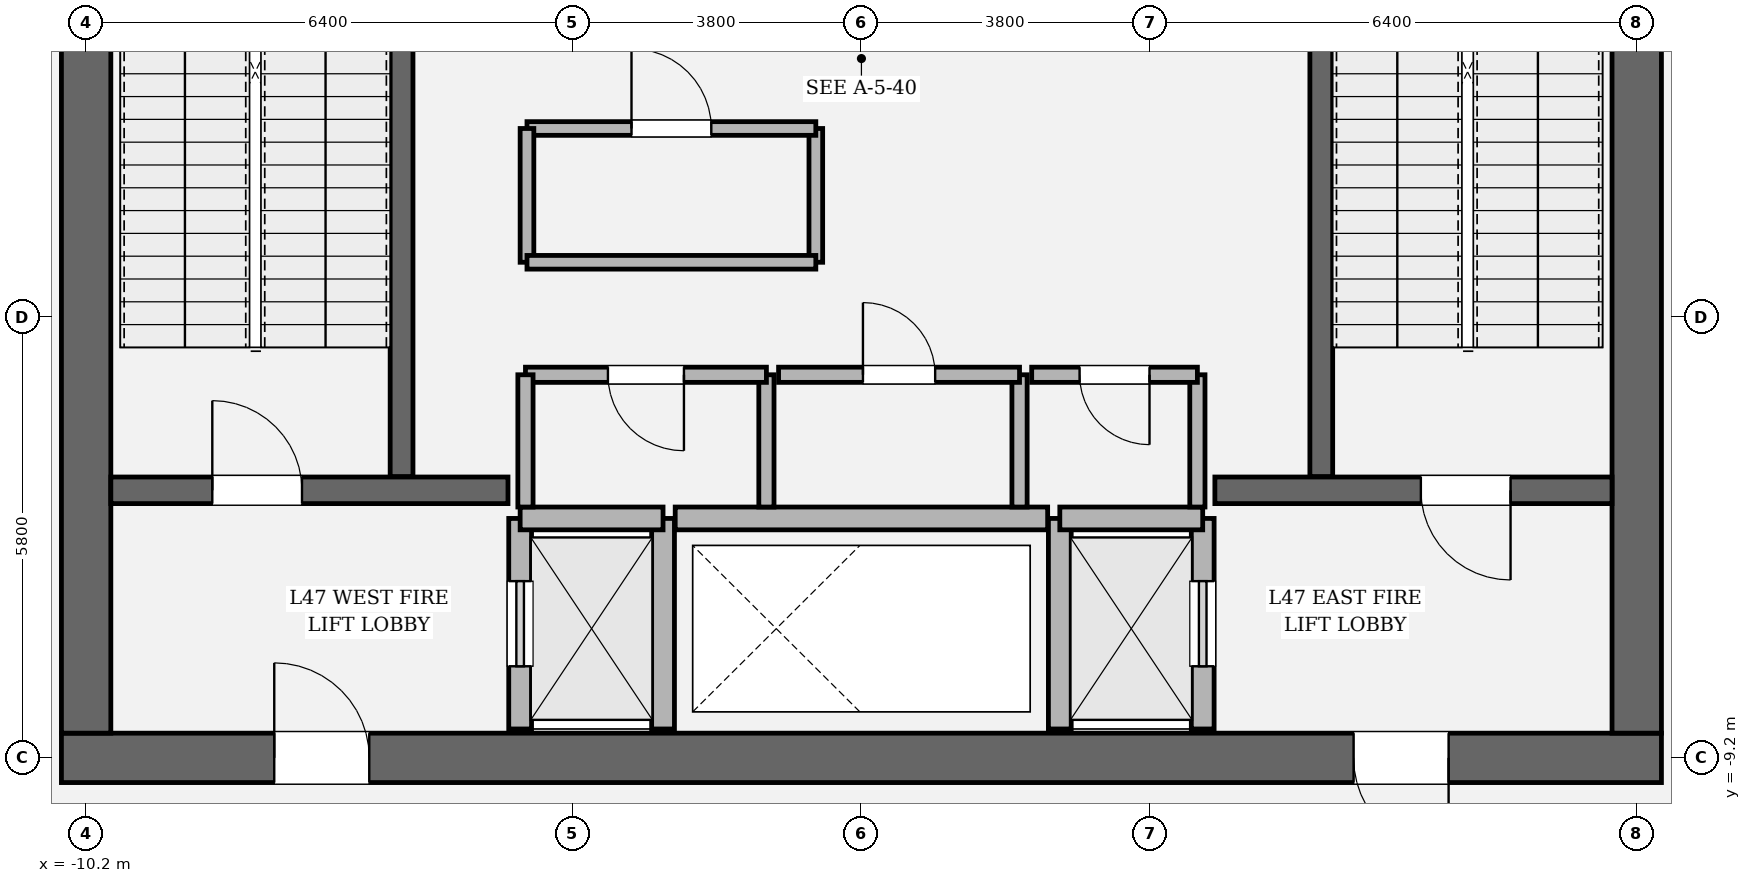
"""IFC4 building model, lengths in metres.
Left out: names, types, materials, properties, quantities, classifications, styles, units other than length and angle.
Written with IfcOpenShell. Run it as: python <this file> out.ifc"""

import sys

from ifc_helpers import new_model, si_unit, direction, frame, frame_2d, origin, place, context, subcontext, project, spatial, rectangle, extrude, element, fill, save


model = new_model("IFC4")
c1 = context("Model", 3, precision=1e-05, world=origin(), true_north=direction((0.0, 1.0)))
c2 = subcontext(c1, "Body", "Model", "MODEL_VIEW")
j1 = project(units=[si_unit("LENGTHUNIT", "METRE"), si_unit("PLANEANGLEUNIT", "RADIAN")], contexts=[c1])
p1 = place(None, origin())
s1 = spatial("IfcSite", under=j1, at=p1, CompositionType="ELEMENT")
p2 = place(p1, origin())
s2 = spatial("IfcBuilding", under=s1, at=p2, CompositionType="ELEMENT")
p3 = place(p2, frame((0.0, 0.0, 200.55)))
s3 = spatial("IfcBuildingStorey", under=s2, at=p3, CompositionType="ELEMENT", Elevation=200.55)
p4 = place(p3, frame((10.525, -9.2, 0.0), z_axis=(0.0, 0.0, 1.0), x_axis=(-1.0, 0.0, 0.0)))
e1 = element("IfcWall", 1, at=p4, inside=s3, PredefinedType="SHEAR", context=c2, shape_type="SweptSolid", body=[
    extrude(rectangle(XDim=21.05, YDim=0.65, at=frame_2d((10.525, 0.0))), origin(), (0.0, 0.0, 1.0), 4.05),
])
p5 = place(p4, frame((2.8, 0.0, 0.0)))
e2 = element("IfcOpeningElement", 2, at=p5, cuts=e1, PredefinedType="OPENING", context=c2, shape_type="SweptSolid", body=[
    extrude(rectangle(XDim=1.25, YDim=2.25, at=frame_2d((0.625, 1.125))), frame((0.0, 0.335, 0.0), z_axis=(0.0, -1.0, 0.0), x_axis=(1.0, 0.0, 0.0)), (0.0, 0.0, 1.0), 0.67),
])
p6 = place(p4, frame((17.0, 0.0, 0.0)))
e3 = element("IfcOpeningElement", 3, at=p6, cuts=e1, PredefinedType="OPENING", context=c2, shape_type="SweptSolid", body=[
    extrude(rectangle(XDim=1.25, YDim=2.25, at=frame_2d((0.625, 1.125))), frame((0.0, 0.335, 0.0), z_axis=(0.0, -1.0, 0.0), x_axis=(1.0, 0.0, 0.0)), (0.0, 0.0, 1.0), 0.67),
])
p7 = place(p3, frame((-10.2, -8.875, 0.0), z_axis=(0.0, 0.0, 1.0), x_axis=(0.0, 1.0, 0.0)))
e4 = element("IfcWall", 4, at=p7, inside=s3, PredefinedType="SHEAR", context=c2, shape_type="SweptSolid", body=[
    extrude(rectangle(XDim=17.75, YDim=0.65, at=frame_2d((8.875, 0.0))), origin(), (0.0, 0.0, 1.0), 4.05),
])
p8 = place(p7, frame((12.665, 0.0, 0.0)))
e5 = element("IfcOpeningElement", 5, at=p8, cuts=e4, PredefinedType="OPENING", context=c2, shape_type="SweptSolid", body=[
    extrude(rectangle(XDim=1.18, YDim=2.2, at=frame_2d((0.59, 1.1))), frame((0.0, 0.335, 0.0), z_axis=(0.0, -1.0, 0.0), x_axis=(1.0, 0.0, 0.0)), (0.0, 0.0, 1.0), 0.67),
])
p9 = place(p3, frame((10.2, 8.875, 0.0), z_axis=(0.0, 0.0, 1.0), x_axis=(0.0, -1.0, 0.0)))
e6 = element("IfcWall", 6, at=p9, inside=s3, PredefinedType="SHEAR", context=c2, shape_type="SweptSolid", body=[
    extrude(rectangle(XDim=17.75, YDim=0.65, at=frame_2d((8.875, 0.0))), origin(), (0.0, 0.0, 1.0), 4.05),
])
p10 = place(p9, frame((3.905, 0.0, 0.0)))
e7 = element("IfcOpeningElement", 7, at=p10, cuts=e6, PredefinedType="OPENING", context=c2, shape_type="SweptSolid", body=[
    extrude(rectangle(XDim=1.18, YDim=2.2, at=frame_2d((0.59, 1.1))), frame((0.0, 0.335, 0.0), z_axis=(0.0, -1.0, 0.0), x_axis=(1.0, 0.0, 0.0)), (0.0, 0.0, 1.0), 0.67),
])
for number, where, z_axis, x_axis in (
    (8, (-6.05, -5.5, 0.0), (0.0, 0.0, 1.0), (0.0, 1.0, 0.0)),
    (9, (6.05, 3.45, 0.0), (0.0, 0.0, 1.0), (0.0, -1.0, 0.0)),
):
    element("IfcWall", number, at=place(p3, frame(where, z_axis=z_axis, x_axis=x_axis)), inside=s3, PredefinedType="SOLIDWALL", context=c2, shape_type="SweptSolid", body=[
        extrude(rectangle(XDim=8.95, YDim=0.3, at=frame_2d((4.475, 0.0))), origin(), (0.0, 0.0, 1.0), 4.05),
    ])
p11 = place(p3, frame((-9.875, -5.68, 0.0), z_axis=(0.0, 0.0, 1.0), x_axis=(1.0, 0.0, 0.0)))
e10 = element("IfcWall", 10, at=p11, inside=s3, PredefinedType="SOLIDWALL", context=c2, shape_type="SweptSolid", body=[
    extrude(rectangle(XDim=5.225, YDim=0.35, at=frame_2d((2.613, 0.0))), origin(), (0.0, 0.0, 1.0), 4.05),
])
p12 = place(p11, frame((1.335, 0.0, 0.0)))
e11 = element("IfcOpeningElement", 11, at=p12, cuts=e10, PredefinedType="OPENING", context=c2, shape_type="SweptSolid", body=[
    extrude(rectangle(XDim=1.18, YDim=2.2, at=frame_2d((0.59, 1.1))), frame((0.0, 0.185, 0.0), z_axis=(0.0, -1.0, 0.0), x_axis=(1.0, 0.0, 0.0)), (0.0, 0.0, 1.0), 0.37),
])
p13 = place(p3, frame((4.65, -5.68, 0.0), z_axis=(0.0, 0.0, 1.0), x_axis=(1.0, 0.0, 0.0)))
e12 = element("IfcWall", 12, at=p13, inside=s3, PredefinedType="SOLIDWALL", context=c2, shape_type="SweptSolid", body=[
    extrude(rectangle(XDim=5.225, YDim=0.35, at=frame_2d((2.613, 0.0))), origin(), (0.0, 0.0, 1.0), 4.05),
])
p14 = place(p13, frame((2.71, 0.0, 0.0)))
e13 = element("IfcOpeningElement", 13, at=p14, cuts=e12, PredefinedType="OPENING", context=c2, shape_type="SweptSolid", body=[
    extrude(rectangle(XDim=1.18, YDim=2.2, at=frame_2d((0.59, 1.1))), frame((0.0, 0.185, 0.0), z_axis=(0.0, -1.0, 0.0), x_axis=(1.0, 0.0, 0.0)), (0.0, 0.0, 1.0), 0.37),
])
p15 = place(p3, frame((-4.49, -8.82, 0.0), z_axis=(0.0, 0.0, 1.0), x_axis=(0.0, 1.0, 0.0)))
e14 = element("IfcWall", 14, at=p15, inside=s3, PredefinedType="SOLIDWALL", context=c2, shape_type="SweptSolid", body=[
    extrude(rectangle(XDim=2.77, YDim=0.3, at=frame_2d((1.385, 0.0))), origin(), (0.0, 0.0, 1.0), 3.77),
])
p16 = place(p15, frame((0.825, 0.0, 0.0)))
e15 = element("IfcOpeningElement", 15, at=p16, cuts=e14, PredefinedType="OPENING", context=c2, shape_type="SweptSolid", body=[
    extrude(rectangle(XDim=1.12, YDim=2.25, at=frame_2d((0.56, 1.125))), frame((0.0, 0.16, 0.0), z_axis=(0.0, -1.0, 0.0), x_axis=(1.0, 0.0, 0.0)), (0.0, 0.0, 1.0), 0.32),
])
p17 = place(p3, frame((-2.61, -8.82, 0.0), z_axis=(0.0, 0.0, 1.0), x_axis=(0.0, 1.0, 0.0)))
e16 = element("IfcWall", 16, at=p17, inside=s3, PredefinedType="SOLIDWALL", context=c2, shape_type="SweptSolid", body=[
    extrude(rectangle(XDim=2.77, YDim=0.3, at=frame_2d((1.385, 0.0))), origin(), (0.0, 0.0, 1.0), 3.77),
])
p18 = place(p3, frame((-4.49, -6.05, 0.0), z_axis=(0.0, 0.0, 1.0), x_axis=(1.0, 0.0, 0.0)))
e17 = element("IfcWall", 17, at=p18, inside=s3, PredefinedType="SOLIDWALL", context=c2, shape_type="SweptSolid", body=[
    extrude(rectangle(XDim=1.88, YDim=0.3, at=frame_2d((0.94, 0.0))), origin(), (0.0, 0.0, 1.0), 3.77),
])
p19 = place(p3, frame((4.49, -8.82, 0.0), z_axis=(0.0, 0.0, 1.0), x_axis=(0.0, 1.0, 0.0)))
e18 = element("IfcWall", 18, at=p19, inside=s3, PredefinedType="SOLIDWALL", context=c2, shape_type="SweptSolid", body=[
    extrude(rectangle(XDim=2.77, YDim=0.3, at=frame_2d((1.385, 0.0))), origin(), (0.0, 0.0, 1.0), 3.77),
])
p20 = place(p19, frame((0.825, 0.0, 0.0)))
e19 = element("IfcOpeningElement", 19, at=p20, cuts=e18, PredefinedType="OPENING", context=c2, shape_type="SweptSolid", body=[
    extrude(rectangle(XDim=1.12, YDim=2.25, at=frame_2d((0.56, 1.125))), frame((0.0, 0.16, 0.0), z_axis=(0.0, -1.0, 0.0), x_axis=(1.0, 0.0, 0.0)), (0.0, 0.0, 1.0), 0.32),
])
p21 = place(p3, frame((2.61, -8.82, 0.0), z_axis=(0.0, 0.0, 1.0), x_axis=(0.0, 1.0, 0.0)))
e20 = element("IfcWall", 20, at=p21, inside=s3, PredefinedType="SOLIDWALL", context=c2, shape_type="SweptSolid", body=[
    extrude(rectangle(XDim=2.77, YDim=0.3, at=frame_2d((1.385, 0.0))), origin(), (0.0, 0.0, 1.0), 3.77),
])
p22 = place(p3, frame((2.61, -6.05, 0.0), z_axis=(0.0, 0.0, 1.0), x_axis=(1.0, 0.0, 0.0)))
e21 = element("IfcWall", 21, at=p22, inside=s3, PredefinedType="SOLIDWALL", context=c2, shape_type="SweptSolid", body=[
    extrude(rectangle(XDim=1.88, YDim=0.3, at=frame_2d((0.94, 0.0))), origin(), (0.0, 0.0, 1.0), 3.77),
])
p23 = place(p3, frame((-2.45, -6.05, 0.0), z_axis=(0.0, 0.0, 1.0), x_axis=(1.0, 0.0, 0.0)))
e22 = element("IfcWall", 22, at=p23, inside=s3, PredefinedType="SOLIDWALL", context=c2, shape_type="SweptSolid", body=[
    extrude(rectangle(XDim=4.9, YDim=0.3, at=frame_2d((2.45, 0.0))), origin(), (0.0, 0.0, 1.0), 3.77),
])
p24 = place(p3, frame((-1.25, -5.9, 0.0), z_axis=(0.0, 0.0, 1.0), x_axis=(0.0, 1.0, 0.0)))
e23 = element("IfcWall", 23, at=p24, inside=s3, PredefinedType="SOLIDWALL", context=c2, shape_type="SweptSolid", body=[
    extrude(rectangle(XDim=1.74, YDim=0.2, at=frame_2d((0.87, 0.0))), origin(), (0.0, 0.0, 1.0), 3.77),
])
p25 = place(p3, frame((-1.25, -4.16, 0.0), z_axis=(0.0, 0.0, 1.0), x_axis=(-1.0, 0.0, 0.0)))
e24 = element("IfcWall", 24, at=p25, inside=s3, PredefinedType="SOLIDWALL", context=c2, shape_type="SweptSolid", body=[
    extrude(rectangle(XDim=3.17, YDim=0.2, at=frame_2d((1.585, 0.0))), origin(), (0.0, 0.0, 1.0), 3.77),
])
p26 = place(p25, frame((1.085, 0.0, 0.0)))
e25 = element("IfcOpeningElement", 25, at=p26, cuts=e24, PredefinedType="OPENING", context=c2, shape_type="SweptSolid", body=[
    extrude(rectangle(XDim=1.0, YDim=2.15, at=frame_2d((0.5, 1.075))), frame((0.0, 0.11, 0.0), z_axis=(0.0, -1.0, 0.0), x_axis=(1.0, 0.0, 0.0)), (0.0, 0.0, 1.0), 0.22),
])
for number, where, z_axis, x_axis in (
    (26, (-4.42, -4.16, 0.0), (0.0, 0.0, 1.0), (0.0, -1.0, 0.0)),
    (27, (2.08, -5.9, 0.0), (0.0, 0.0, 1.0), (0.0, 1.0, 0.0)),
):
    element("IfcWall", number, at=place(p3, frame(where, z_axis=z_axis, x_axis=x_axis)), inside=s3, PredefinedType="SOLIDWALL", context=c2, shape_type="SweptSolid", body=[
        extrude(rectangle(XDim=1.74, YDim=0.2, at=frame_2d((0.87, 0.0))), origin(), (0.0, 0.0, 1.0), 3.77),
    ])
p27 = place(p3, frame((2.08, -4.16, 0.0), z_axis=(0.0, 0.0, 1.0), x_axis=(-1.0, 0.0, 0.0)))
e28 = element("IfcWall", 28, at=p27, inside=s3, PredefinedType="SOLIDWALL", context=c2, shape_type="SweptSolid", body=[
    extrude(rectangle(XDim=3.17, YDim=0.2, at=frame_2d((1.585, 0.0))), origin(), (0.0, 0.0, 1.0), 3.77),
])
p28 = place(p27, frame((1.11, 0.0, 0.0)))
e29 = element("IfcOpeningElement", 29, at=p28, cuts=e28, PredefinedType="OPENING", context=c2, shape_type="SweptSolid", body=[
    extrude(rectangle(XDim=0.95, YDim=2.15, at=frame_2d((0.475, 1.075))), frame((0.0, 0.11, 0.0), z_axis=(0.0, -1.0, 0.0), x_axis=(1.0, 0.0, 0.0)), (0.0, 0.0, 1.0), 0.22),
])
p29 = place(p3, frame((4.42, -5.9, 0.0), z_axis=(0.0, 0.0, 1.0), x_axis=(0.0, 1.0, 0.0)))
e30 = element("IfcWall", 30, at=p29, inside=s3, PredefinedType="SOLIDWALL", context=c2, shape_type="SweptSolid", body=[
    extrude(rectangle(XDim=1.74, YDim=0.2, at=frame_2d((0.87, 0.0))), origin(), (0.0, 0.0, 1.0), 3.77),
])
p30 = place(p3, frame((4.42, -4.16, 0.0), z_axis=(0.0, 0.0, 1.0), x_axis=(-1.0, 0.0, 0.0)))
e31 = element("IfcWall", 31, at=p30, inside=s3, PredefinedType="SOLIDWALL", context=c2, shape_type="SweptSolid", body=[
    extrude(rectangle(XDim=2.18, YDim=0.2, at=frame_2d((1.09, 0.0))), origin(), (0.0, 0.0, 1.0), 3.77),
])
p31 = place(p30, frame((0.63, 0.0, 0.0)))
e32 = element("IfcOpeningElement", 32, at=p31, cuts=e31, PredefinedType="OPENING", context=c2, shape_type="SweptSolid", body=[
    extrude(rectangle(XDim=0.92, YDim=2.1, at=frame_2d((0.46, 1.05))), frame((0.0, 0.11, 0.0), z_axis=(0.0, -1.0, 0.0), x_axis=(1.0, 0.0, 0.0)), (0.0, 0.0, 1.0), 0.22),
])
p32 = place(p3, frame((-0.6, -2.68, 0.0), z_axis=(0.0, 0.0, 1.0), x_axis=(0.0, 1.0, 0.0)))
e33 = element("IfcWall", 33, at=p32, inside=s3, PredefinedType="PARTITIONING", context=c2, shape_type="SweptSolid", body=[
    extrude(rectangle(XDim=1.76, YDim=0.18, at=frame_2d((0.88, 0.0))), origin(), (0.0, 0.0, 1.0), 3.77),
])
p33 = place(p3, frame((-0.6, -0.92, 0.0), z_axis=(0.0, 0.0, 1.0), x_axis=(-1.0, 0.0, 0.0)))
e34 = element("IfcWall", 34, at=p33, inside=s3, PredefinedType="PARTITIONING", context=c2, shape_type="SweptSolid", body=[
    extrude(rectangle(XDim=3.8, YDim=0.18, at=frame_2d((1.9, 0.0))), origin(), (0.0, 0.0, 1.0), 3.77),
])
p34 = place(p33, frame((1.375, 0.0, 0.0)))
e35 = element("IfcOpeningElement", 35, at=p34, cuts=e34, PredefinedType="OPENING", context=c2, shape_type="SweptSolid", body=[
    extrude(rectangle(XDim=1.05, YDim=2.2, at=frame_2d((0.525, 1.1))), frame((0.0, 0.1, 0.0), z_axis=(0.0, -1.0, 0.0), x_axis=(1.0, 0.0, 0.0)), (0.0, 0.0, 1.0), 0.2),
])
p35 = place(p3, frame((-4.4, -0.92, 0.0), z_axis=(0.0, 0.0, 1.0), x_axis=(0.0, -1.0, 0.0)))
e36 = element("IfcWall", 36, at=p35, inside=s3, PredefinedType="PARTITIONING", context=c2, shape_type="SweptSolid", body=[
    extrude(rectangle(XDim=1.76, YDim=0.18, at=frame_2d((0.88, 0.0))), origin(), (0.0, 0.0, 1.0), 3.77),
])
p36 = place(p3, frame((-4.4, -2.68, 0.0), z_axis=(0.0, 0.0, 1.0), x_axis=(1.0, 0.0, 0.0)))
e37 = element("IfcWall", 37, at=p36, inside=s3, PredefinedType="PARTITIONING", context=c2, shape_type="SweptSolid", body=[
    extrude(rectangle(XDim=3.8, YDim=0.18, at=frame_2d((1.9, 0.0))), origin(), (0.0, 0.0, 1.0), 3.77),
])
p37 = place(p12, origin())
e38 = element("IfcDoor", 38, at=p37, inside=s3, OperationType="SINGLE_SWING_LEFT", PredefinedType="DOOR", context=c2, shape_type="SweptSolid", body=[
    extrude(rectangle(XDim=1.18, YDim=2.2, at=frame_2d((0.59, 1.1))), frame((0.0, 0.025, 0.0), z_axis=(0.0, -1.0, 0.0), x_axis=(1.0, 0.0, 0.0)), (0.0, 0.0, 1.0), 0.05),
])
fill(e11, e38)
p38 = place(p14, origin())
e39 = element("IfcDoor", 39, at=p38, inside=s3, OperationType="SINGLE_SWING_RIGHT", PredefinedType="DOOR", context=c2, shape_type="SweptSolid", body=[
    extrude(rectangle(XDim=1.18, YDim=2.2, at=frame_2d((0.59, 1.1))), frame((0.0, 0.025, 0.0), z_axis=(0.0, -1.0, 0.0), x_axis=(1.0, 0.0, 0.0)), (0.0, 0.0, 1.0), 0.05),
])
fill(e13, e39)
p39 = place(p5, origin())
e40 = element("IfcDoor", 40, at=p39, inside=s3, OperationType="SINGLE_SWING_LEFT", PredefinedType="DOOR", context=c2, shape_type="SweptSolid", body=[
    extrude(rectangle(XDim=1.25, YDim=2.25, at=frame_2d((0.625, 1.125))), frame((0.0, 0.025, 0.0), z_axis=(0.0, -1.0, 0.0), x_axis=(1.0, 0.0, 0.0)), (0.0, 0.0, 1.0), 0.05),
])
fill(e2, e40)
p40 = place(p6, origin())
e41 = element("IfcDoor", 41, at=p40, inside=s3, OperationType="SINGLE_SWING_RIGHT", PredefinedType="DOOR", context=c2, shape_type="SweptSolid", body=[
    extrude(rectangle(XDim=1.25, YDim=2.25, at=frame_2d((0.625, 1.125))), frame((0.0, 0.025, 0.0), z_axis=(0.0, -1.0, 0.0), x_axis=(1.0, 0.0, 0.0)), (0.0, 0.0, 1.0), 0.05),
])
fill(e3, e41)
p41 = place(p16, origin())
e42 = element("IfcDoor", 42, at=p41, inside=s3, OperationType="SLIDING_TO_LEFT", PredefinedType="DOOR", context=c2, shape_type="SweptSolid", body=[
    extrude(rectangle(XDim=1.12, YDim=2.25, at=frame_2d((0.56, 1.125))), frame((0.0, 0.025, 0.0), z_axis=(0.0, -1.0, 0.0), x_axis=(1.0, 0.0, 0.0)), (0.0, 0.0, 1.0), 0.05),
])
fill(e15, e42)
p42 = place(p20, origin())
e43 = element("IfcDoor", 43, at=p42, inside=s3, OperationType="SLIDING_TO_RIGHT", PredefinedType="DOOR", context=c2, shape_type="SweptSolid", body=[
    extrude(rectangle(XDim=1.12, YDim=2.25, at=frame_2d((0.56, 1.125))), frame((0.0, 0.025, 0.0), z_axis=(0.0, -1.0, 0.0), x_axis=(1.0, 0.0, 0.0)), (0.0, 0.0, 1.0), 0.05),
])
fill(e19, e43)
p43 = place(p26, origin())
e44 = element("IfcDoor", 44, at=p43, inside=s3, OperationType="SINGLE_SWING_LEFT", PredefinedType="DOOR", context=c2, shape_type="SweptSolid", body=[
    extrude(rectangle(XDim=1.0, YDim=2.15, at=frame_2d((0.5, 1.075))), frame((0.0, 0.025, 0.0), z_axis=(0.0, -1.0, 0.0), x_axis=(1.0, 0.0, 0.0)), (0.0, 0.0, 1.0), 0.05),
])
fill(e25, e44)
p44 = place(p28, origin())
e45 = element("IfcDoor", 45, at=p44, inside=s3, OperationType="SINGLE_SWING_RIGHT", PredefinedType="DOOR", context=c2, shape_type="SweptSolid", body=[
    extrude(rectangle(XDim=0.95, YDim=2.15, at=frame_2d((0.475, 1.075))), frame((0.0, 0.025, 0.0), z_axis=(0.0, -1.0, 0.0), x_axis=(1.0, 0.0, 0.0)), (0.0, 0.0, 1.0), 0.05),
])
fill(e29, e45)
p45 = place(p31, origin())
e46 = element("IfcDoor", 46, at=p45, inside=s3, OperationType="SINGLE_SWING_LEFT", PredefinedType="DOOR", context=c2, shape_type="SweptSolid", body=[
    extrude(rectangle(XDim=0.92, YDim=2.1, at=frame_2d((0.46, 1.05))), frame((0.0, 0.025, 0.0), z_axis=(0.0, -1.0, 0.0), x_axis=(1.0, 0.0, 0.0)), (0.0, 0.0, 1.0), 0.05),
])
fill(e32, e46)
p46 = place(p34, origin())
e47 = element("IfcDoor", 47, at=p46, inside=s3, OperationType="SINGLE_SWING_RIGHT", PredefinedType="DOOR", context=c2, shape_type="SweptSolid", body=[
    extrude(rectangle(XDim=1.05, YDim=2.2, at=frame_2d((0.525, 1.1))), frame((0.0, 0.025, 0.0), z_axis=(0.0, -1.0, 0.0), x_axis=(1.0, 0.0, 0.0)), (0.0, 0.0, 1.0), 0.05),
])
fill(e35, e47)
save(model, sys.argv[1])
